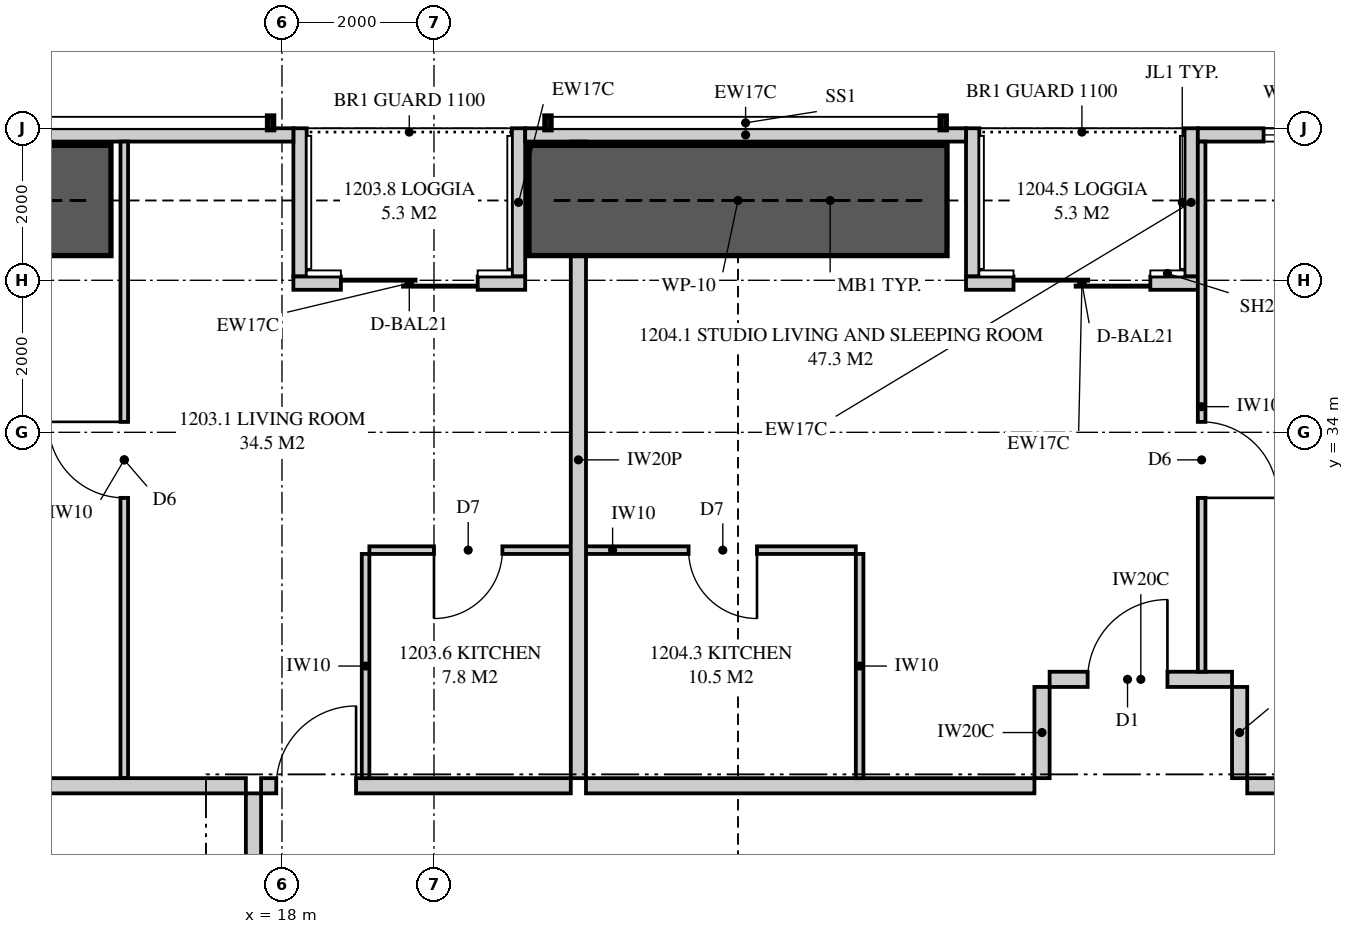
"""IFC4 building model, lengths in metres.
Left out: names, types, materials, properties, quantities, classifications, styles, units other than length and angle.
Written with IfcOpenShell. Run it as: python <this file> out.ifc"""

import sys

from ifc_helpers import new_model, si_unit, direction, frame, frame_2d, origin, place, context, subcontext, project, spatial, polyline, rectangle, outline, extrude, element, fill, save


model = new_model("IFC4")
c1 = context("Model", 3, precision=1e-05, world=origin(), true_north=direction((0.0, 1.0)))
c2 = subcontext(c1, "Body", "Model", "MODEL_VIEW")
j1 = project(units=[si_unit("LENGTHUNIT", "METRE"), si_unit("PLANEANGLEUNIT", "RADIAN")], contexts=[c1])
p1 = place(None, origin())
s1 = spatial("IfcSite", under=j1, at=p1, CompositionType="ELEMENT")
p2 = place(p1, origin())
s2 = spatial("IfcBuilding", under=s1, at=p2, CompositionType="ELEMENT")
p3 = place(p2, frame((0.0, 0.0, 47.8)))
s3 = spatial("IfcBuildingStorey", under=s2, at=p3, CompositionType="ELEMENT", Elevation=47.8)
p4 = place(p3, frame((38.149, 37.913, 0.0), z_axis=(0.0, 0.0, 1.0), x_axis=(-1.0, 0.0, 0.0)))
e1 = element("IfcWall", 1, at=p4, inside=s3, PredefinedType="SOLIDWALL", context=c2, shape_type="SweptSolid", body=[
    extrude(outline(polyline([(0.0, 0.0), (8.099, 0.0), (8.099, 2.15), (3.149, 2.15), (3.149, 3.11), (2.993, 3.11), (2.993, 2.15), (2.945, 2.15), (2.945, 3.11), (0.0, 3.11), (0.0, 0.0)])), frame((0.0, 0.087, 0.0), z_axis=(0.0, -1.0, 0.0), x_axis=(1.0, 0.0, 0.0)), (0.0, 0.0, 1.0), 0.175),
])
p5 = place(p4, frame((6.034, 0.0, 0.4)))
e2 = element("IfcOpeningElement", 2, at=p5, cuts=e1, PredefinedType="OPENING", context=c2, shape_type="SweptSolid", body=[
    extrude(rectangle(XDim=1.2, YDim=1.7, at=frame_2d((0.6, 0.85))), frame((0.0, 0.097, 0.0), z_axis=(0.0, -1.0, 0.0), x_axis=(1.0, 0.0, 0.0)), (0.0, 0.0, 1.0), 0.195),
])
p6 = place(p3, frame((27.0, 37.913, 0.0), z_axis=(0.0, 0.0, 1.0), x_axis=(-1.0, 0.0, 0.0)))
e3 = element("IfcWall", 3, at=p6, inside=s3, PredefinedType="SOLIDWALL", context=c2, shape_type="SweptSolid", body=[
    extrude(rectangle(XDim=5.8, YDim=0.175, at=frame_2d((2.9, 0.0))), origin(), (0.0, 0.0, 1.0), 2.15),
])
p7 = place(p3, frame((18.15, 37.913, 0.0), z_axis=(0.0, 0.0, 1.0), x_axis=(-1.0, 0.0, 0.0)))
e4 = element("IfcWall", 4, at=p7, inside=s3, PredefinedType="SOLIDWALL", context=c2, shape_type="SweptSolid", body=[
    extrude(outline(polyline([(0.0, 0.0), (13.099, 0.0), (13.099, 3.11), (5.354, 3.11), (5.354, 2.15), (5.306, 2.15), (5.306, 3.11), (5.15, 3.11), (5.15, 2.15), (0.0, 2.15), (0.0, 0.0)])), frame((0.0, 0.087, 0.0), z_axis=(0.0, -1.0, 0.0), x_axis=(1.0, 0.0, 0.0)), (0.0, 0.0, 1.0), 0.175),
])
p8 = place(p7, frame((9.05, 0.0, 0.4)))
e5 = element("IfcOpeningElement", 5, at=p8, cuts=e4, PredefinedType="OPENING", context=c2, shape_type="SweptSolid", body=[
    extrude(rectangle(XDim=1.8, YDim=1.7, at=frame_2d((0.9, 0.85))), frame((0.0, 0.097, 0.0), z_axis=(0.0, -1.0, 0.0), x_axis=(1.0, 0.0, 0.0)), (0.0, 0.0, 1.0), 0.195),
])
p9 = place(p3, frame((30.05, 35.962, 0.0), z_axis=(0.0, 0.0, 1.0), x_axis=(-1.0, 0.0, 0.0)))
e6 = element("IfcWall", 6, at=p9, inside=s3, PredefinedType="SOLIDWALL", context=c2, shape_type="SweptSolid", body=[
    extrude(rectangle(XDim=3.05, YDim=0.175, at=frame_2d((1.525, 0.0))), origin(), (0.0, 0.0, 1.0), 3.11),
])
p10 = place(p9, frame((0.625, 0.0, 0.0)))
e7 = element("IfcOpeningElement", 7, at=p10, cuts=e6, PredefinedType="OPENING", context=c2, shape_type="SweptSolid", body=[
    extrude(rectangle(XDim=1.8, YDim=2.1, at=frame_2d((0.9, 1.05))), frame((0.0, 0.097, 0.0), z_axis=(0.0, -1.0, 0.0), x_axis=(1.0, 0.0, 0.0)), (0.0, 0.0, 1.0), 0.195),
])
for number, where, z_axis, x_axis in (
    (8, (29.962, 38.0, 0.0), (0.0, 0.0, 1.0), (0.0, -1.0, 0.0)),
    (9, (27.087, 38.0, 0.0), (0.0, 0.0, 1.0), (0.0, -1.0, 0.0)),
):
    element("IfcWall", number, at=place(p3, frame(where, z_axis=z_axis, x_axis=x_axis)), inside=s3, PredefinedType="SOLIDWALL", context=c2, shape_type="SweptSolid", body=[
        extrude(outline(polyline([(0.0, 0.0), (1.95, 0.0), (1.95, 3.11), (1.75, 3.11), (1.75, 2.15), (0.15, 2.15), (0.15, 3.11), (0.0, 3.11), (0.0, 0.0)])), frame((0.0, 0.087, 0.0), z_axis=(0.0, -1.0, 0.0), x_axis=(1.0, 0.0, 0.0)), (0.0, 0.0, 1.0), 0.175),
    ])
p11 = place(p3, frame((21.2, 35.962, 0.0), z_axis=(0.0, 0.0, 1.0), x_axis=(-1.0, 0.0, 0.0)))
e10 = element("IfcWall", 10, at=p11, inside=s3, PredefinedType="SOLIDWALL", context=c2, shape_type="SweptSolid", body=[
    extrude(rectangle(XDim=3.05, YDim=0.175, at=frame_2d((1.525, 0.0))), origin(), (0.0, 0.0, 1.0), 3.11),
])
p12 = place(p11, frame((0.625, 0.0, 0.0)))
e11 = element("IfcOpeningElement", 11, at=p12, cuts=e10, PredefinedType="OPENING", context=c2, shape_type="SweptSolid", body=[
    extrude(rectangle(XDim=1.8, YDim=2.1, at=frame_2d((0.9, 1.05))), frame((0.0, 0.097, 0.0), z_axis=(0.0, -1.0, 0.0), x_axis=(1.0, 0.0, 0.0)), (0.0, 0.0, 1.0), 0.195),
])
for number, where, z_axis, x_axis in (
    (12, (21.113, 38.0, 0.0), (0.0, 0.0, 1.0), (0.0, -1.0, 0.0)),
    (13, (18.238, 38.0, 0.0), (0.0, 0.0, 1.0), (0.0, -1.0, 0.0)),
):
    element("IfcWall", number, at=place(p3, frame(where, z_axis=z_axis, x_axis=x_axis)), inside=s3, PredefinedType="SOLIDWALL", context=c2, shape_type="SweptSolid", body=[
        extrude(outline(polyline([(0.0, 0.0), (1.95, 0.0), (1.95, 3.11), (1.75, 3.11), (1.75, 2.15), (0.15, 2.15), (0.15, 3.11), (0.0, 3.11), (0.0, 0.0)])), frame((0.0, 0.087, 0.0), z_axis=(0.0, -1.0, 0.0), x_axis=(1.0, 0.0, 0.0)), (0.0, 0.0, 1.0), 0.175),
    ])
p13 = place(p3, frame((21.9, 37.825, 0.0), z_axis=(0.0, 0.0, 1.0), x_axis=(0.0, -1.0, 0.0)))
e14 = element("IfcWall", 14, at=p13, inside=s3, PredefinedType="PARTITIONING", context=c2, shape_type="SweptSolid", body=[
    extrude(outline(polyline([(0.529, 2.15), (0.0, 2.15), (0.0, 0.0), (0.529, 0.0), (0.529, 0.055), (1.021, 0.055), (1.021, 0.0), (8.375, 0.0), (8.375, 3.11), (1.685, 3.11), (1.685, 2.15), (1.021, 2.15), (1.021, 2.094), (0.529, 2.094), (0.529, 2.15)])), frame((0.0, 0.1, 0.0), z_axis=(0.0, -1.0, 0.0), x_axis=(1.0, 0.0, 0.0)), (0.0, 0.0, 1.0), 0.2),
])
p14 = place(p3, frame((17.725, 29.35, 0.0), z_axis=(0.0, 0.0, 1.0), x_axis=(1.0, 0.0, 0.0)))
e15 = element("IfcWall", 15, at=p14, inside=s3, PredefinedType="PARTITIONING", context=c2, shape_type="SweptSolid", body=[
    extrude(rectangle(XDim=4.075, YDim=0.2, at=frame_2d((2.038, 0.0))), origin(), (0.0, 0.0, 1.0), 3.11),
])
p15 = place(p14, frame((0.2, 0.0, 0.0)))
e16 = element("IfcOpeningElement", 16, at=p15, cuts=e15, PredefinedType="OPENING", context=c2, shape_type="SweptSolid", body=[
    extrude(rectangle(XDim=1.05, YDim=2.2, at=frame_2d((0.525, 1.1))), frame((0.0, 0.11, 0.0), z_axis=(0.0, -1.0, 0.0), x_axis=(1.0, 0.0, 0.0)), (0.0, 0.0, 1.0), 0.22),
])
p16 = place(p3, frame((19.15, 32.45, 0.0), z_axis=(0.0, 0.0, 1.0), x_axis=(1.0, 0.0, 0.0)))
e17 = element("IfcWall", 17, at=p16, inside=s3, PredefinedType="PARTITIONING", context=c2, shape_type="SweptSolid", body=[
    extrude(rectangle(XDim=2.65, YDim=0.1, at=frame_2d((1.325, 0.0))), origin(), (0.0, 0.0, 1.0), 3.11),
])
p17 = place(p16, frame((0.85, 0.0, 0.0)))
e18 = element("IfcOpeningElement", 18, at=p17, cuts=e17, PredefinedType="OPENING", context=c2, shape_type="SweptSolid", body=[
    extrude(rectangle(XDim=0.9, YDim=2.1, at=frame_2d((0.45, 1.05))), frame((0.0, 0.06, 0.0), z_axis=(0.0, -1.0, 0.0), x_axis=(1.0, 0.0, 0.0)), (0.0, 0.0, 1.0), 0.12),
])
p18 = place(p3, frame((19.1, 32.4, 0.0), z_axis=(0.0, 0.0, 1.0), x_axis=(0.0, -1.0, 0.0)))
e19 = element("IfcWall", 19, at=p18, inside=s3, PredefinedType="PARTITIONING", context=c2, shape_type="SweptSolid", body=[
    extrude(rectangle(XDim=2.95, YDim=0.1, at=frame_2d((1.475, 0.0))), origin(), (0.0, 0.0, 1.0), 3.11),
])
p19 = place(p3, frame((15.925, 37.825, 0.0), z_axis=(0.0, 0.0, 1.0), x_axis=(0.0, -1.0, 0.0)))
e20 = element("IfcWall", 20, at=p19, inside=s3, PredefinedType="PARTITIONING", context=c2, shape_type="SweptSolid", body=[
    extrude(outline(polyline([(0.0, 0.0), (8.375, 0.0), (8.375, 3.11), (1.635, 3.11), (1.635, 2.15), (0.0, 2.15), (0.0, 3.11), (0.0, 0.0)])), frame((0.0, 0.05, 0.0), z_axis=(0.0, -1.0, 0.0), x_axis=(1.0, 0.0, 0.0)), (0.0, 0.0, 1.0), 0.1),
])
p20 = place(p19, frame((3.688, 0.0, 0.0)))
e21 = element("IfcOpeningElement", 21, at=p20, cuts=e20, PredefinedType="OPENING", context=c2, shape_type="SweptSolid", body=[
    extrude(rectangle(XDim=1.0, YDim=2.1, at=frame_2d((0.5, 1.05))), frame((0.0, 0.06, 0.0), z_axis=(0.0, -1.0, 0.0), x_axis=(1.0, 0.0, 0.0)), (0.0, 0.0, 1.0), 0.12),
])
p21 = place(p3, frame((22.0, 29.35, 0.0), z_axis=(0.0, 0.0, 1.0), x_axis=(1.0, 0.0, 0.0)))
e22 = element("IfcWall", 22, at=p21, inside=s3, PredefinedType="PARTITIONING", context=c2, shape_type="SweptSolid", body=[
    extrude(outline(polyline([(0.0, 0.0), (5.9, 0.0), (5.9, 3.11), (2.337, 3.11), (2.337, 2.541), (1.663, 2.541), (1.663, 3.11), (0.0, 3.11), (0.0, 0.0)])), frame((0.0, 0.1, 0.0), z_axis=(0.0, -1.0, 0.0), x_axis=(1.0, 0.0, 0.0)), (0.0, 0.0, 1.0), 0.2),
])
p22 = place(p3, frame((22.0, 32.45, 0.0), z_axis=(0.0, 0.0, 1.0), x_axis=(1.0, 0.0, 0.0)))
e23 = element("IfcWall", 23, at=p22, inside=s3, PredefinedType="PARTITIONING", context=c2, shape_type="SweptSolid", body=[
    extrude(outline(polyline([(0.0, 0.0), (3.55, 0.0), (3.55, 3.11), (2.287, 3.11), (2.287, 2.541), (1.713, 2.541), (1.713, 3.11), (0.0, 3.11), (0.0, 0.0)])), frame((0.0, 0.05, 0.0), z_axis=(0.0, -1.0, 0.0), x_axis=(1.0, 0.0, 0.0)), (0.0, 0.0, 1.0), 0.1),
])
p23 = place(p22, frame((1.35, 0.0, 0.0)))
e24 = element("IfcOpeningElement", 24, at=p23, cuts=e23, PredefinedType="OPENING", context=c2, shape_type="SweptSolid", body=[
    extrude(rectangle(XDim=0.9, YDim=2.1, at=frame_2d((0.45, 1.05))), frame((0.0, 0.06, 0.0), z_axis=(0.0, -1.0, 0.0), x_axis=(1.0, 0.0, 0.0)), (0.0, 0.0, 1.0), 0.12),
])
p24 = place(p3, frame((25.6, 32.4, 0.0), z_axis=(0.0, 0.0, 1.0), x_axis=(0.0, -1.0, 0.0)))
e25 = element("IfcWall", 25, at=p24, inside=s3, PredefinedType="PARTITIONING", context=c2, shape_type="SweptSolid", body=[
    extrude(rectangle(XDim=2.95, YDim=0.1, at=frame_2d((1.475, 0.0))), origin(), (0.0, 0.0, 1.0), 3.11),
])
p25 = place(p3, frame((30.1, 37.825, 0.0), z_axis=(0.0, 0.0, 1.0), x_axis=(0.0, -1.0, 0.0)))
e26 = element("IfcWall", 26, at=p25, inside=s3, PredefinedType="PARTITIONING", context=c2, shape_type="SweptSolid", body=[
    extrude(outline(polyline([(0.0, 0.0), (6.975, 0.0), (6.975, 3.11), (1.635, 3.11), (1.635, 2.15), (0.0, 2.15), (0.0, 3.11), (0.0, 0.0)])), frame((0.0, 0.05, 0.0), z_axis=(0.0, -1.0, 0.0), x_axis=(1.0, 0.0, 0.0)), (0.0, 0.0, 1.0), 0.1),
])
p26 = place(p25, frame((3.688, 0.0, 0.0)))
e27 = element("IfcOpeningElement", 27, at=p26, cuts=e26, PredefinedType="OPENING", context=c2, shape_type="SweptSolid", body=[
    extrude(rectangle(XDim=1.0, YDim=2.1, at=frame_2d((0.5, 1.05))), frame((0.0, 0.06, 0.0), z_axis=(0.0, -1.0, 0.0), x_axis=(1.0, 0.0, 0.0)), (0.0, 0.0, 1.0), 0.12),
])
p27 = place(p3, frame((2.0, 29.35, 0.0), z_axis=(0.0, 0.0, 1.0), x_axis=(1.0, 0.0, 0.0)))
e28 = element("IfcWall", 28, at=p27, inside=s3, PredefinedType="PARTITIONING", context=c2, shape_type="SweptSolid", body=[
    extrude(outline(polyline([(0.0, 0.0), (15.525, 0.0), (15.525, 3.11), (11.337, 3.11), (11.337, 2.541), (10.663, 2.541), (10.663, 3.11), (9.51, 3.11), (9.51, 2.51), (6.89, 2.51), (6.89, 3.11), (2.969, 3.11), (2.969, 2.541), (2.577, 2.541), (2.577, 2.15), (0.733, 2.15), (0.733, 3.11), (0.0, 3.11), (0.0, 0.0)])), frame((0.0, 0.1, 0.0), z_axis=(0.0, -1.0, 0.0), x_axis=(1.0, 0.0, 0.0)), (0.0, 0.0, 1.0), 0.2),
])
p28 = place(p3, frame((17.625, 15.25, 0.0), z_axis=(0.0, 0.0, 1.0), x_axis=(0.0, 1.0, 0.0)))
e29 = element("IfcWall", 29, at=p28, inside=s3, PredefinedType="PARTITIONING", context=c2, shape_type="SweptSolid", body=[
    extrude(outline(polyline([(0.0, 0.0), (14.0, 0.0), (14.0, 3.11), (10.087, 3.11), (10.087, 2.541), (9.413, 2.541), (9.413, 3.11), (0.0, 3.11), (0.0, 0.0)])), frame((0.0, 0.1, 0.0), z_axis=(0.0, -1.0, 0.0), x_axis=(1.0, 0.0, 0.0)), (0.0, 0.0, 1.0), 0.2),
])
p29 = place(p28, frame((6.5, 0.0, 0.0)))
e30 = element("IfcOpeningElement", 30, at=p29, cuts=e29, PredefinedType="OPENING", context=c2, shape_type="SweptSolid", body=[
    extrude(rectangle(XDim=1.05, YDim=2.2, at=frame_2d((0.525, 1.1))), frame((0.0, 0.11, 0.0), z_axis=(0.0, -1.0, 0.0), x_axis=(1.0, 0.0, 0.0)), (0.0, 0.0, 1.0), 0.22),
])
p30 = place(p3, frame((30.7, 29.35, 0.0), z_axis=(0.0, 0.0, 1.0), x_axis=(1.0, 0.0, 0.0)))
e31 = element("IfcWall", 31, at=p30, inside=s3, PredefinedType="PARTITIONING", context=c2, shape_type="SweptSolid", body=[
    extrude(outline(polyline([(0.0, 0.0), (5.5, 0.0), (5.5, 3.11), (4.637, 3.11), (4.637, 2.541), (3.963, 2.541), (3.963, 3.11), (0.0, 3.11), (0.0, 0.0)])), frame((0.0, 0.1, 0.0), z_axis=(0.0, -1.0, 0.0), x_axis=(1.0, 0.0, 0.0)), (0.0, 0.0, 1.0), 0.2),
])
p31 = place(p3, frame((28.1, 30.75, 0.0), z_axis=(0.0, 0.0, 1.0), x_axis=(1.0, 0.0, 0.0)))
e32 = element("IfcWall", 32, at=p31, inside=s3, PredefinedType="PARTITIONING", context=c2, shape_type="SweptSolid", body=[
    extrude(rectangle(XDim=2.4, YDim=0.2, at=frame_2d((1.2, 0.0))), origin(), (0.0, 0.0, 1.0), 3.11),
])
p32 = place(p31, frame((0.5, 0.0, 0.0)))
e33 = element("IfcOpeningElement", 33, at=p32, cuts=e32, PredefinedType="OPENING", context=c2, shape_type="SweptSolid", body=[
    extrude(rectangle(XDim=1.05, YDim=2.2, at=frame_2d((0.525, 1.1))), frame((0.0, 0.11, 0.0), z_axis=(0.0, -1.0, 0.0), x_axis=(1.0, 0.0, 0.0)), (0.0, 0.0, 1.0), 0.22),
])
for number, where, z_axis, x_axis in (
    (34, (28.0, 29.45, 0.0), (0.0, 0.0, 1.0), (0.0, 1.0, 0.0)),
    (35, (30.6, 29.45, 0.0), (0.0, 0.0, 1.0), (0.0, 1.0, 0.0)),
):
    element("IfcWall", number, at=place(p3, frame(where, z_axis=z_axis, x_axis=x_axis)), inside=s3, PredefinedType="PARTITIONING", context=c2, shape_type="SweptSolid", body=[
        extrude(rectangle(XDim=1.2, YDim=0.2, at=frame_2d((0.6, 0.0))), origin(), (0.0, 0.0, 1.0), 3.11),
    ])
for number, where, z_axis, x_axis in (
    (36, (21.25, 37.05, 0.0), (0.0, 0.0, 1.0), (1.0, 0.0, 0.0)),
    (37, (10.25, 37.05, 0.0), (0.0, 0.0, 1.0), (1.0, 0.0, 0.0)),
):
    element("IfcWall", number, at=place(p3, frame(where, z_axis=z_axis, x_axis=x_axis)), inside=s3, PredefinedType="SHEAR", context=c2, shape_type="SweptSolid", body=[
        extrude(rectangle(XDim=5.5, YDim=1.45, at=frame_2d((2.75, 0.0))), origin(), (0.0, 0.0, 1.0), 3.35),
    ])
p33 = place(p5, origin())
e38 = element("IfcWindow", 38, at=p33, inside=s3, PartitioningType="SINGLE_PANEL", PredefinedType="WINDOW", context=c2, shape_type="SweptSolid", body=[
    extrude(rectangle(XDim=1.2, YDim=1.7, at=frame_2d((0.6, 0.85))), frame((0.0, 0.03, 0.0), z_axis=(0.0, -1.0, 0.0), x_axis=(1.0, 0.0, 0.0)), (0.0, 0.0, 1.0), 0.06),
])
fill(e2, e38)
p34 = place(p10, origin())
e39 = element("IfcDoor", 39, at=p34, inside=s3, OperationType="SLIDING_TO_LEFT", PredefinedType="DOOR", context=c2, shape_type="SweptSolid", body=[
    extrude(rectangle(XDim=1.8, YDim=2.1, at=frame_2d((0.9, 1.05))), frame((0.0, 0.025, 0.0), z_axis=(0.0, -1.0, 0.0), x_axis=(1.0, 0.0, 0.0)), (0.0, 0.0, 1.0), 0.05),
])
fill(e7, e39)
p35 = place(p12, origin())
e40 = element("IfcDoor", 40, at=p35, inside=s3, OperationType="SLIDING_TO_LEFT", PredefinedType="DOOR", context=c2, shape_type="SweptSolid", body=[
    extrude(rectangle(XDim=1.8, YDim=2.1, at=frame_2d((0.9, 1.05))), frame((0.0, 0.025, 0.0), z_axis=(0.0, -1.0, 0.0), x_axis=(1.0, 0.0, 0.0)), (0.0, 0.0, 1.0), 0.05),
])
fill(e11, e40)
p36 = place(p15, origin())
e41 = element("IfcDoor", 41, at=p36, inside=s3, OperationType="SINGLE_SWING_RIGHT", PredefinedType="DOOR", context=c2, shape_type="SweptSolid", body=[
    extrude(rectangle(XDim=1.05, YDim=2.2, at=frame_2d((0.525, 1.1))), frame((0.0, 0.025, 0.0), z_axis=(0.0, -1.0, 0.0), x_axis=(1.0, 0.0, 0.0)), (0.0, 0.0, 1.0), 0.05),
])
fill(e16, e41)
p37 = place(p17, frame((0.9, 0.0, 0.0), z_axis=(0.0, 0.0, 1.0), x_axis=(-1.0, 0.0, 0.0)))
e42 = element("IfcDoor", 42, at=p37, inside=s3, OperationType="SINGLE_SWING_RIGHT", PredefinedType="DOOR", context=c2, shape_type="SweptSolid", body=[
    extrude(rectangle(XDim=0.9, YDim=2.1, at=frame_2d((0.45, 1.05))), frame((0.0, 0.025, 0.0), z_axis=(0.0, -1.0, 0.0), x_axis=(1.0, 0.0, 0.0)), (0.0, 0.0, 1.0), 0.05),
])
fill(e18, e42)
p38 = place(p20, frame((1.0, 0.0, 0.0), z_axis=(0.0, 0.0, 1.0), x_axis=(-1.0, 0.0, 0.0)))
e43 = element("IfcDoor", 43, at=p38, inside=s3, OperationType="SINGLE_SWING_RIGHT", PredefinedType="DOOR", context=c2, shape_type="SweptSolid", body=[
    extrude(rectangle(XDim=1.0, YDim=2.1, at=frame_2d((0.5, 1.05))), frame((0.0, 0.025, 0.0), z_axis=(0.0, -1.0, 0.0), x_axis=(1.0, 0.0, 0.0)), (0.0, 0.0, 1.0), 0.05),
])
fill(e21, e43)
p39 = place(p32, origin())
e44 = element("IfcDoor", 44, at=p39, inside=s3, OperationType="SINGLE_SWING_RIGHT", PredefinedType="DOOR", context=c2, shape_type="SweptSolid", body=[
    extrude(rectangle(XDim=1.05, YDim=2.2, at=frame_2d((0.525, 1.1))), frame((0.0, 0.025, 0.0), z_axis=(0.0, -1.0, 0.0), x_axis=(1.0, 0.0, 0.0)), (0.0, 0.0, 1.0), 0.05),
])
fill(e33, e44)
p40 = place(p23, frame((0.9, 0.0, 0.0), z_axis=(0.0, 0.0, 1.0), x_axis=(-1.0, 0.0, 0.0)))
e45 = element("IfcDoor", 45, at=p40, inside=s3, OperationType="SINGLE_SWING_LEFT", PredefinedType="DOOR", context=c2, shape_type="SweptSolid", body=[
    extrude(rectangle(XDim=0.9, YDim=2.1, at=frame_2d((0.45, 1.05))), frame((0.0, 0.025, 0.0), z_axis=(0.0, -1.0, 0.0), x_axis=(1.0, 0.0, 0.0)), (0.0, 0.0, 1.0), 0.05),
])
fill(e24, e45)
p41 = place(p26, origin())
e46 = element("IfcDoor", 46, at=p41, inside=s3, OperationType="SINGLE_SWING_RIGHT", PredefinedType="DOOR", context=c2, shape_type="SweptSolid", body=[
    extrude(rectangle(XDim=1.0, YDim=2.1, at=frame_2d((0.5, 1.05))), frame((0.0, 0.025, 0.0), z_axis=(0.0, -1.0, 0.0), x_axis=(1.0, 0.0, 0.0)), (0.0, 0.0, 1.0), 0.05),
])
fill(e27, e46)
save(model, sys.argv[1])
